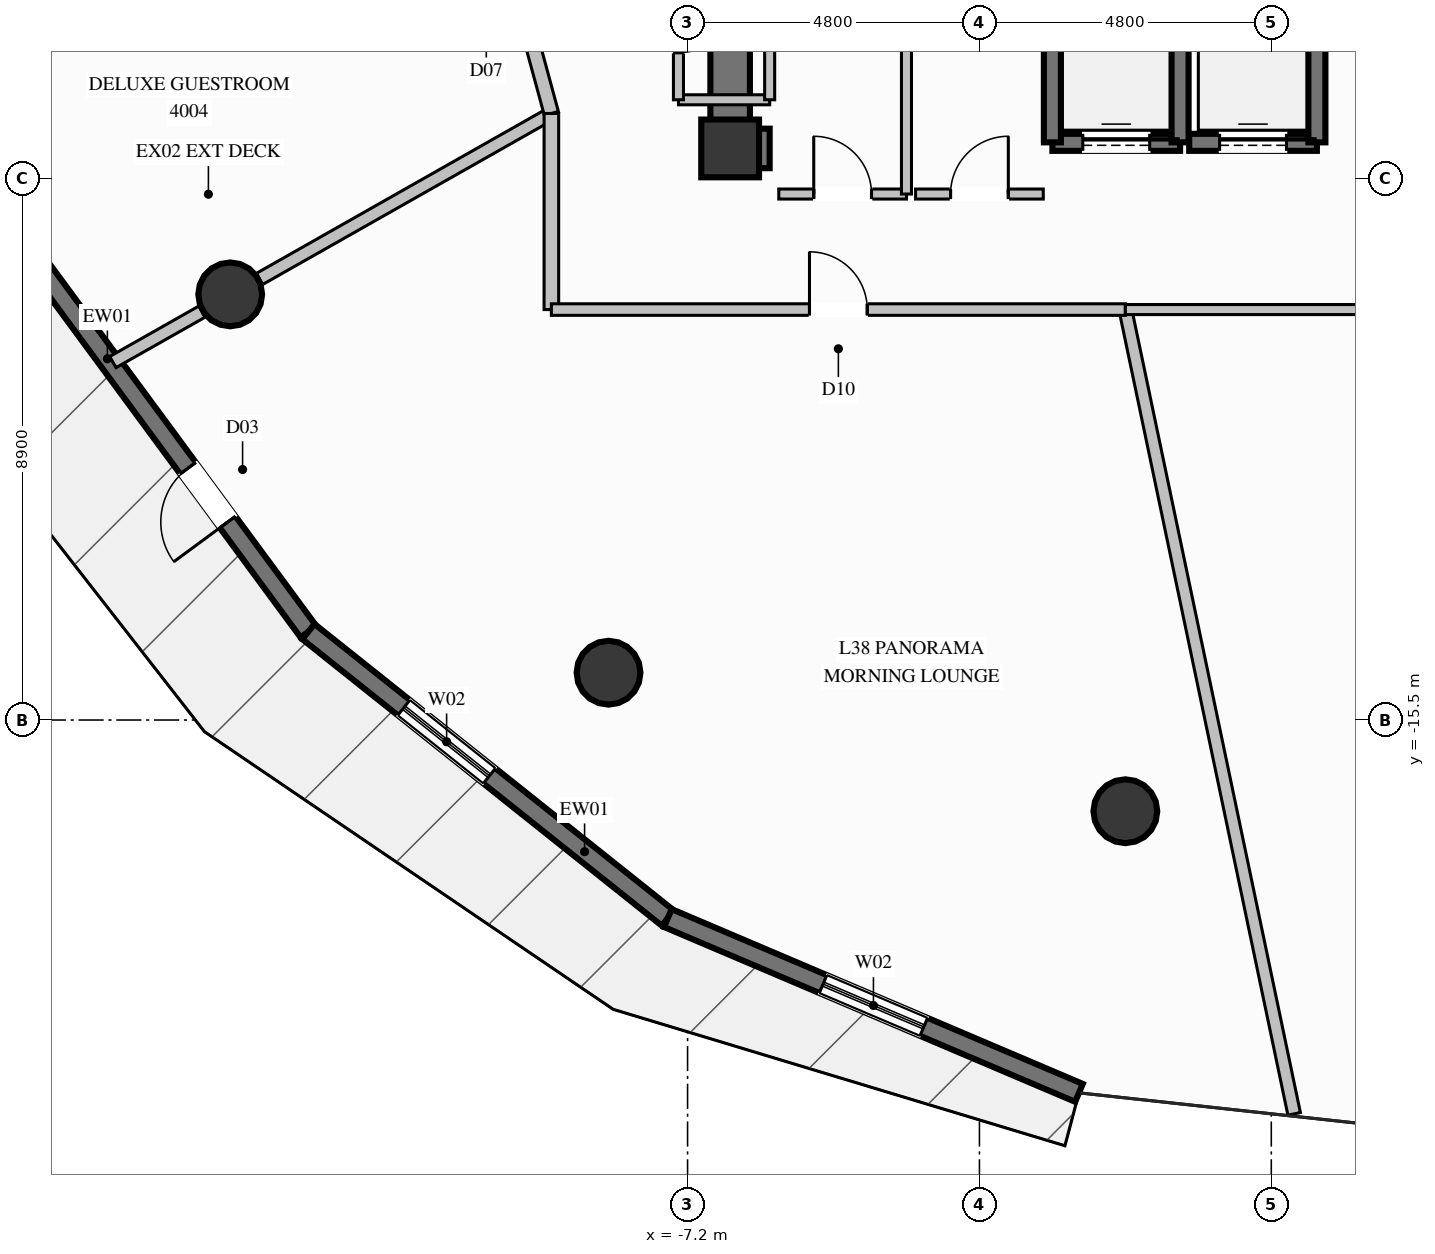
"""IFC4 building model, lengths in metres.
Left out: names, types, materials, properties, quantities, classifications, styles, units other than length and angle.
Written with IfcOpenShell. Run it as: python <this file> out.ifc"""

import sys

from ifc_helpers import new_model, si_unit, direction, frame, frame_2d, origin, origin_2d, place, context, subcontext, project, spatial, rectangle, circle, extrude, element, fill, save


model = new_model("IFC4")
c1 = context("Model", 3, precision=1e-05, world=origin(), true_north=direction((0.0, 1.0)))
c2 = subcontext(c1, "Body", "Model", "MODEL_VIEW")
j1 = project(units=[si_unit("LENGTHUNIT", "METRE"), si_unit("PLANEANGLEUNIT", "RADIAN")], contexts=[c1])
p1 = place(None, origin())
s1 = spatial("IfcSite", under=j1, at=p1, CompositionType="ELEMENT")
p2 = place(p1, origin())
s2 = spatial("IfcBuilding", under=s1, at=p2, CompositionType="ELEMENT")
p3 = place(p2, frame((0.0, 0.0, 149.4)))
s3 = spatial("IfcBuildingStorey", under=s2, at=p3, CompositionType="ELEMENT", Elevation=149.4)
p4 = place(p3, frame((-6.5, -6.1, 0.0), z_axis=(0.0, 0.0, 1.0), x_axis=(1.0, 0.0, 0.0)))
e1 = element("IfcColumn", 1, at=p4, inside=s3, PredefinedType="COLUMN", context=c2, shape_type="SweptSolid", body=[
    extrude(rectangle(XDim=0.95, YDim=0.95, at=origin_2d()), origin(), (0.0, 0.0, 1.0), 3.6),
])
p5 = place(p3, frame((-6.175, -6.1, 0.0), z_axis=(0.0, 0.0, 1.0), x_axis=(1.0, 0.0, 0.0)))
e2 = element("IfcWall", 2, at=p5, inside=s3, PredefinedType="SHEAR", context=c2, shape_type="SweptSolid", body=[
    extrude(rectangle(XDim=0.325, YDim=0.65, at=frame_2d((0.163, 0.0))), origin(), (0.0, 0.0, 1.0), 3.6),
])
p6 = place(p3, frame((-6.5, -6.425, 0.0), z_axis=(0.0, 0.0, 1.0), x_axis=(0.0, 1.0, 0.0)))
e3 = element("IfcWall", 3, at=p6, inside=s3, PredefinedType="SHEAR", context=c2, shape_type="SweptSolid", body=[
    extrude(rectangle(XDim=3.075, YDim=0.65, at=frame_2d((1.538, 0.0))), origin(), (0.0, 0.0, 1.0), 3.6),
])
for number, where, z_axis, x_axis in (
    (4, (-14.722, -8.5, 0.0), (0.0, 0.0, 1.0), (1.0, 0.0, 0.0)),
    (5, (-8.5, -14.722, 0.0), (0.0, 0.0, 1.0), (1.0, 0.0, 0.0)),
    (6, (0.0, -17.0, 0.0), (0.0, 0.0, 1.0), (1.0, 0.0, 0.0)),
):
    element("IfcColumn", number, at=place(p3, frame(where, z_axis=z_axis, x_axis=x_axis)), inside=s3, PredefinedType="COLUMN", context=c2, shape_type="SweptSolid", body=[
        extrude(circle(Radius=0.525, at=origin_2d()), origin(), (0.0, 0.0, 1.0), 3.6),
    ])
p7 = place(p3, frame((-13.436, -14.046, 0.0), z_axis=(0.0, 0.0, 1.0), x_axis=(-0.593218870088, 0.805041223896, 0.0)))
e7 = element("IfcWall", 7, at=p7, inside=s3, PredefinedType="SOLIDWALL", context=c2, shape_type="SweptSolid", body=[
    extrude(rectangle(XDim=7.559, YDim=0.32, at=frame_2d((3.779, 0.0))), origin(), (0.0, 0.0, 1.0), 3.35),
])
p8 = place(p7, frame((2.238, 0.0, 0.0)))
e8 = element("IfcOpeningElement", 8, at=p8, cuts=e7, PredefinedType="OPENING", context=c2, shape_type="SweptSolid", body=[
    extrude(rectangle(XDim=1.1, YDim=2.2, at=frame_2d((0.55, 1.1))), frame((0.0, 0.17, 0.0), z_axis=(0.0, -1.0, 0.0), x_axis=(1.0, 0.0, 0.0)), (0.0, 0.0, 1.0), 0.34),
])
p9 = place(p3, frame((-7.524, -18.757, 0.0), z_axis=(0.0, 0.0, 1.0), x_axis=(-0.782061518956, 0.623201236013, 0.0)))
e9 = element("IfcWall", 9, at=p9, inside=s3, PredefinedType="SOLIDWALL", context=c2, shape_type="SweptSolid", body=[
    extrude(rectangle(XDim=7.56, YDim=0.32, at=frame_2d((3.78, 0.0))), origin(), (0.0, 0.0, 1.0), 3.35),
])
p10 = place(p9, frame((3.753, 0.0, 0.35)))
e10 = element("IfcOpeningElement", 10, at=p10, cuts=e9, PredefinedType="OPENING", context=c2, shape_type="SweptSolid", body=[
    extrude(rectangle(XDim=1.8, YDim=2.6, at=frame_2d((0.9, 1.3))), frame((0.0, 0.17, 0.0), z_axis=(0.0, -1.0, 0.0), x_axis=(1.0, 0.0, 0.0)), (0.0, 0.0, 1.0), 0.34),
])
p11 = place(p3, frame((-0.763, -21.631, 0.0), z_axis=(0.0, 0.0, 1.0), x_axis=(-0.920301307609, 0.391210305607, 0.0)))
e11 = element("IfcWall", 11, at=p11, inside=s3, PredefinedType="SOLIDWALL", context=c2, shape_type="SweptSolid", body=[
    extrude(rectangle(XDim=7.346, YDim=0.32, at=frame_2d((3.673, 0.0))), origin(), (0.0, 0.0, 1.0), 3.35),
])
p12 = place(p11, frame((2.773, 0.0, 0.35)))
e12 = element("IfcOpeningElement", 12, at=p12, cuts=e11, PredefinedType="OPENING", context=c2, shape_type="SweptSolid", body=[
    extrude(rectangle(XDim=1.8, YDim=2.6, at=frame_2d((0.9, 1.3))), frame((0.0, 0.17, 0.0), z_axis=(0.0, -1.0, 0.0), x_axis=(1.0, 0.0, 0.0)), (0.0, 0.0, 1.0), 0.34),
])
p13 = place(p3, frame((-1.2, -6.0, 0.0), z_axis=(0.0, 0.0, 1.0), x_axis=(1.0, 0.0, 0.0)))
e13 = element("IfcWall", 13, at=p13, inside=s3, PredefinedType="SOLIDWALL", context=c2, shape_type="SweptSolid", body=[
    extrude(rectangle(XDim=2.1, YDim=0.28, at=frame_2d((1.05, 0.0))), origin(), (0.0, 0.0, 1.0), 3.35),
])
p14 = place(p13, frame((0.5, 0.0, 0.0)))
e14 = element("IfcOpeningElement", 14, at=p14, cuts=e13, PredefinedType="OPENING", context=c2, shape_type="SweptSolid", body=[
    extrude(rectangle(XDim=1.1, YDim=2.2, at=frame_2d((0.55, 1.1))), frame((0.0, 0.15, 0.0), z_axis=(0.0, -1.0, 0.0), x_axis=(1.0, 0.0, 0.0)), (0.0, 0.0, 1.0), 0.3),
])
for number, where, z_axis, x_axis in (
    (15, (-1.2, -3.5, 0.0), (0.0, 0.0, 1.0), (0.0, -1.0, 0.0)),
    (16, (0.9, -6.0, 0.0), (0.0, 0.0, 1.0), (0.0, 1.0, 0.0)),
):
    element("IfcWall", number, at=place(p3, frame(where, z_axis=z_axis, x_axis=x_axis)), inside=s3, PredefinedType="SOLIDWALL", context=c2, shape_type="SweptSolid", body=[
        extrude(rectangle(XDim=2.5, YDim=0.28, at=frame_2d((1.25, 0.0))), origin(), (0.0, 0.0, 1.0), 3.35),
    ])
p15 = place(p3, frame((1.05, -6.0, 0.0), z_axis=(0.0, 0.0, 1.0), x_axis=(1.0, 0.0, 0.0)))
e17 = element("IfcWall", 17, at=p15, inside=s3, PredefinedType="SOLIDWALL", context=c2, shape_type="SweptSolid", body=[
    extrude(rectangle(XDim=2.1, YDim=0.28, at=frame_2d((1.05, 0.0))), origin(), (0.0, 0.0, 1.0), 3.35),
])
p16 = place(p15, frame((0.5, 0.0, 0.0)))
e18 = element("IfcOpeningElement", 18, at=p16, cuts=e17, PredefinedType="OPENING", context=c2, shape_type="SweptSolid", body=[
    extrude(rectangle(XDim=1.1, YDim=2.2, at=frame_2d((0.55, 1.1))), frame((0.0, 0.15, 0.0), z_axis=(0.0, -1.0, 0.0), x_axis=(1.0, 0.0, 0.0)), (0.0, 0.0, 1.0), 0.3),
])
p17 = place(p3, frame((3.15, -6.0, 0.0), z_axis=(0.0, 0.0, 1.0), x_axis=(0.0, 1.0, 0.0)))
e19 = element("IfcWall", 19, at=p17, inside=s3, PredefinedType="SOLIDWALL", context=c2, shape_type="SweptSolid", body=[
    extrude(rectangle(XDim=2.5, YDim=0.28, at=frame_2d((1.25, 0.0))), origin(), (0.0, 0.0, 1.0), 3.35),
])
p18 = place(p3, frame((-7.35, -5.3, 0.0), z_axis=(0.0, 0.0, 1.0), x_axis=(1.0, 0.0, 0.0)))
e20 = element("IfcWall", 20, at=p18, inside=s3, PredefinedType="PARTITIONING", context=c2, shape_type="SweptSolid", body=[
    extrude(rectangle(XDim=1.5, YDim=0.165, at=frame_2d((0.75, 0.0))), origin(), (0.0, 0.0, 1.0), 2.435),
])
p19 = place(p3, frame((-5.85, -5.3, 0.0), z_axis=(0.0, 0.0, 1.0), x_axis=(0.0, 1.0, 0.0)))
e21 = element("IfcWall", 21, at=p19, inside=s3, PredefinedType="PARTITIONING", context=c2, shape_type="SweptSolid", body=[
    extrude(rectangle(XDim=2.5, YDim=0.165, at=frame_2d((1.25, 0.0))), origin(), (0.0, 0.0, 1.0), 2.435),
])
p20 = place(p3, frame((-7.35, -2.8, 0.0), z_axis=(0.0, 0.0, 1.0), x_axis=(0.0, -1.0, 0.0)))
e22 = element("IfcWall", 22, at=p20, inside=s3, PredefinedType="PARTITIONING", context=c2, shape_type="SweptSolid", body=[
    extrude(rectangle(XDim=2.5, YDim=0.165, at=frame_2d((1.25, 0.0))), origin(), (0.0, 0.0, 1.0), 3.35),
])
p21 = place(p20, frame((0.775, 0.0, 0.0)))
e23 = element("IfcOpeningElement", 23, at=p21, cuts=e22, PredefinedType="OPENING", context=c2, shape_type="SweptSolid", body=[
    extrude(rectangle(XDim=0.95, YDim=2.1, at=frame_2d((0.475, 1.05))), frame((0.0, 0.093, 0.0), z_axis=(0.0, -1.0, 0.0), x_axis=(1.0, 0.0, 0.0)), (0.0, 0.0, 1.0), 0.185),
])
p22 = place(p3, frame((-5.7, -6.85, 0.0), z_axis=(0.0, 0.0, 1.0), x_axis=(1.0, 0.0, 0.0)))
e24 = element("IfcWall", 24, at=p22, inside=s3, PredefinedType="PARTITIONING", context=c2, shape_type="SweptSolid", body=[
    extrude(rectangle(XDim=2.1, YDim=0.165, at=frame_2d((1.05, 0.0))), origin(), (0.0, 0.0, 1.0), 2.435),
])
p23 = place(p22, frame((0.575, 0.0, 0.0)))
e25 = element("IfcOpeningElement", 25, at=p23, cuts=e24, PredefinedType="OPENING", context=c2, shape_type="SweptSolid", body=[
    extrude(rectangle(XDim=0.95, YDim=2.1, at=frame_2d((0.475, 1.05))), frame((0.0, 0.093, 0.0), z_axis=(0.0, -1.0, 0.0), x_axis=(1.0, 0.0, 0.0)), (0.0, 0.0, 1.0), 0.185),
])
p24 = place(p3, frame((-3.6, -6.85, 0.0), z_axis=(0.0, 0.0, 1.0), x_axis=(0.0, 1.0, 0.0)))
e26 = element("IfcWall", 26, at=p24, inside=s3, PredefinedType="PARTITIONING", context=c2, shape_type="SweptSolid", body=[
    extrude(rectangle(XDim=3.35, YDim=0.165, at=frame_2d((1.675, 0.0))), origin(), (0.0, 0.0, 1.0), 3.35),
])
p25 = place(p3, frame((-3.45, -6.85, 0.0), z_axis=(0.0, 0.0, 1.0), x_axis=(1.0, 0.0, 0.0)))
e27 = element("IfcWall", 27, at=p25, inside=s3, PredefinedType="PARTITIONING", context=c2, shape_type="SweptSolid", body=[
    extrude(rectangle(XDim=2.1, YDim=0.165, at=frame_2d((1.05, 0.0))), origin(), (0.0, 0.0, 1.0), 2.435),
])
p26 = place(p25, frame((0.575, 0.0, 0.0)))
e28 = element("IfcOpeningElement", 28, at=p26, cuts=e27, PredefinedType="OPENING", context=c2, shape_type="SweptSolid", body=[
    extrude(rectangle(XDim=0.95, YDim=2.1, at=frame_2d((0.475, 1.05))), frame((0.0, 0.093, 0.0), z_axis=(0.0, -1.0, 0.0), x_axis=(1.0, 0.0, 0.0)), (0.0, 0.0, 1.0), 0.185),
])
p27 = place(p3, frame((-9.44, -5.525, 0.0), z_axis=(0.0, 0.0, 1.0), x_axis=(-0.86993170577, -0.493172208561, 0.0)))
e29 = element("IfcWall", 29, at=p27, inside=s3, PredefinedType="PARTITIONING", context=c2, shape_type="SweptSolid", body=[
    extrude(rectangle(XDim=5.518, YDim=0.21, at=frame_2d((2.759, 0.0))), origin(), (0.0, 0.0, 1.0), 2.717),
])
p28 = place(p3, frame((-15.187, -8.784, 0.0), z_axis=(0.0, 0.0, 1.0), x_axis=(-0.870057423981, -0.492950381859, 0.0)))
e30 = element("IfcWall", 30, at=p28, inside=s3, PredefinedType="PARTITIONING", context=c2, shape_type="SweptSolid", body=[
    extrude(rectangle(XDim=1.684, YDim=0.21, at=frame_2d((0.842, 0.0))), origin(), (0.0, 0.0, 1.0), 3.35),
])
p29 = place(p3, frame((-10.287, -2.407, 0.0), z_axis=(0.0, 0.0, 1.0), x_axis=(0.262202977539, -0.965012745289, 0.0)))
e31 = element("IfcWall", 31, at=p29, inside=s3, PredefinedType="PARTITIONING", context=c2, shape_type="SweptSolid", body=[
    extrude(rectangle(XDim=3.231, YDim=0.24, at=frame_2d((1.615, 0.0))), origin(), (0.0, 0.0, 1.0), 3.35),
])
p30 = place(p29, frame((1.115, 0.0, 0.0)))
e32 = element("IfcOpeningElement", 32, at=p30, cuts=e31, PredefinedType="OPENING", context=c2, shape_type="SweptSolid", body=[
    extrude(rectangle(XDim=1.0, YDim=2.2, at=frame_2d((0.5, 1.1))), frame((0.0, 0.13, 0.0), z_axis=(0.0, -1.0, 0.0), x_axis=(1.0, 0.0, 0.0)), (0.0, 0.0, 1.0), 0.26),
])
p31 = place(p3, frame((0.0, -8.75, 0.0), z_axis=(0.0, 0.0, 1.0), x_axis=(0.205389549812, -0.978680301645, 0.0)))
e33 = element("IfcWall", 33, at=p31, inside=s3, PredefinedType="PARTITIONING", context=c2, shape_type="SweptSolid", body=[
    extrude(rectangle(XDim=13.515, YDim=0.21, at=frame_2d((6.758, 0.0))), origin(), (0.0, 0.0, 1.0), 3.35),
])
p32 = place(p3, frame((-9.44, -5.525, 0.0), z_axis=(0.0, 0.0, 1.0), x_axis=(0.0, -1.0, 0.0)))
e34 = element("IfcWall", 34, at=p32, inside=s3, PredefinedType="PARTITIONING", context=c2, shape_type="SweptSolid", body=[
    extrude(rectangle(XDim=3.225, YDim=0.24, at=frame_2d((1.613, 0.0))), origin(), (0.0, 0.0, 1.0), 3.35),
])
p33 = place(p3, frame((-9.44, -8.75, 0.0), z_axis=(0.0, 0.0, 1.0), x_axis=(1.0, 0.0, 0.0)))
e35 = element("IfcWall", 35, at=p33, inside=s3, PredefinedType="PARTITIONING", context=c2, shape_type="SweptSolid", body=[
    extrude(rectangle(XDim=9.44, YDim=0.19, at=frame_2d((4.72, 0.0))), origin(), (0.0, 0.0, 1.0), 3.35),
])
p34 = place(p33, frame((4.245, 0.0, 0.0)))
e36 = element("IfcOpeningElement", 36, at=p34, cuts=e35, PredefinedType="OPENING", context=c2, shape_type="SweptSolid", body=[
    extrude(rectangle(XDim=0.95, YDim=2.1, at=frame_2d((0.475, 1.05))), frame((0.0, 0.105, 0.0), z_axis=(0.0, -1.0, 0.0), x_axis=(1.0, 0.0, 0.0)), (0.0, 0.0, 1.0), 0.21),
])
p35 = place(p3, frame((0.0, -8.75, 0.0), z_axis=(0.0, 0.0, 1.0), x_axis=(1.0, 0.0, 0.0)))
e37 = element("IfcWall", 37, at=p35, inside=s3, PredefinedType="PARTITIONING", context=c2, shape_type="SweptSolid", body=[
    extrude(rectangle(XDim=9.44, YDim=0.165, at=frame_2d((4.72, 0.0))), origin(), (0.0, 0.0, 1.0), 3.35),
])
p36 = place(p35, frame((4.245, 0.0, 0.0)))
e38 = element("IfcOpeningElement", 38, at=p36, cuts=e37, PredefinedType="OPENING", context=c2, shape_type="SweptSolid", body=[
    extrude(rectangle(XDim=0.95, YDim=2.1, at=frame_2d((0.475, 1.05))), frame((0.0, 0.093, 0.0), z_axis=(0.0, -1.0, 0.0), x_axis=(1.0, 0.0, 0.0)), (0.0, 0.0, 1.0), 0.185),
])
p37 = place(p8, origin())
e39 = element("IfcDoor", 39, at=p37, inside=s3, OperationType="SINGLE_SWING_LEFT", PredefinedType="DOOR", context=c2, shape_type="SweptSolid", body=[
    extrude(rectangle(XDim=1.1, YDim=2.2, at=frame_2d((0.55, 1.1))), frame((0.0, 0.025, 0.0), z_axis=(0.0, -1.0, 0.0), x_axis=(1.0, 0.0, 0.0)), (0.0, 0.0, 1.0), 0.05),
])
fill(e8, e39)
p38 = place(p10, origin())
e40 = element("IfcWindow", 40, at=p38, inside=s3, PartitioningType="SINGLE_PANEL", PredefinedType="WINDOW", context=c2, shape_type="SweptSolid", body=[
    extrude(rectangle(XDim=1.8, YDim=2.6, at=frame_2d((0.9, 1.3))), frame((0.0, 0.03, 0.0), z_axis=(0.0, -1.0, 0.0), x_axis=(1.0, 0.0, 0.0)), (0.0, 0.0, 1.0), 0.06),
])
fill(e10, e40)
p39 = place(p12, origin())
e41 = element("IfcWindow", 41, at=p39, inside=s3, PartitioningType="SINGLE_PANEL", PredefinedType="WINDOW", context=c2, shape_type="SweptSolid", body=[
    extrude(rectangle(XDim=1.8, YDim=2.6, at=frame_2d((0.9, 1.3))), frame((0.0, 0.03, 0.0), z_axis=(0.0, -1.0, 0.0), x_axis=(1.0, 0.0, 0.0)), (0.0, 0.0, 1.0), 0.06),
])
fill(e12, e41)
p40 = place(p14, origin())
e42 = element("IfcDoor", 42, at=p40, inside=s3, OperationType="SLIDING_TO_LEFT", PredefinedType="DOOR", context=c2, shape_type="SweptSolid", body=[
    extrude(rectangle(XDim=1.1, YDim=2.2, at=frame_2d((0.55, 1.1))), frame((0.0, 0.025, 0.0), z_axis=(0.0, -1.0, 0.0), x_axis=(1.0, 0.0, 0.0)), (0.0, 0.0, 1.0), 0.05),
])
fill(e14, e42)
p41 = place(p16, origin())
e43 = element("IfcDoor", 43, at=p41, inside=s3, OperationType="SLIDING_TO_LEFT", PredefinedType="DOOR", context=c2, shape_type="SweptSolid", body=[
    extrude(rectangle(XDim=1.1, YDim=2.2, at=frame_2d((0.55, 1.1))), frame((0.0, 0.025, 0.0), z_axis=(0.0, -1.0, 0.0), x_axis=(1.0, 0.0, 0.0)), (0.0, 0.0, 1.0), 0.05),
])
fill(e18, e43)
p42 = place(p21, origin())
e44 = element("IfcDoor", 44, at=p42, inside=s3, OperationType="SINGLE_SWING_LEFT", PredefinedType="DOOR", context=c2, shape_type="SweptSolid", body=[
    extrude(rectangle(XDim=0.95, YDim=2.1, at=frame_2d((0.475, 1.05))), frame((0.0, 0.025, 0.0), z_axis=(0.0, -1.0, 0.0), x_axis=(1.0, 0.0, 0.0)), (0.0, 0.0, 1.0), 0.05),
])
fill(e23, e44)
p43 = place(p23, origin())
e45 = element("IfcDoor", 45, at=p43, inside=s3, OperationType="SINGLE_SWING_LEFT", PredefinedType="DOOR", context=c2, shape_type="SweptSolid", body=[
    extrude(rectangle(XDim=0.95, YDim=2.1, at=frame_2d((0.475, 1.05))), frame((0.0, 0.025, 0.0), z_axis=(0.0, -1.0, 0.0), x_axis=(1.0, 0.0, 0.0)), (0.0, 0.0, 1.0), 0.05),
])
fill(e25, e45)
p44 = place(p26, origin())
e46 = element("IfcDoor", 46, at=p44, inside=s3, OperationType="SINGLE_SWING_RIGHT", PredefinedType="DOOR", context=c2, shape_type="SweptSolid", body=[
    extrude(rectangle(XDim=0.95, YDim=2.1, at=frame_2d((0.475, 1.05))), frame((0.0, 0.025, 0.0), z_axis=(0.0, -1.0, 0.0), x_axis=(1.0, 0.0, 0.0)), (0.0, 0.0, 1.0), 0.05),
])
fill(e28, e46)
p45 = place(p34, origin())
e47 = element("IfcDoor", 47, at=p45, inside=s3, OperationType="SINGLE_SWING_LEFT", PredefinedType="DOOR", context=c2, shape_type="SweptSolid", body=[
    extrude(rectangle(XDim=0.95, YDim=2.1, at=frame_2d((0.475, 1.05))), frame((0.0, 0.025, 0.0), z_axis=(0.0, -1.0, 0.0), x_axis=(1.0, 0.0, 0.0)), (0.0, 0.0, 1.0), 0.05),
])
fill(e36, e47)
save(model, sys.argv[1])
